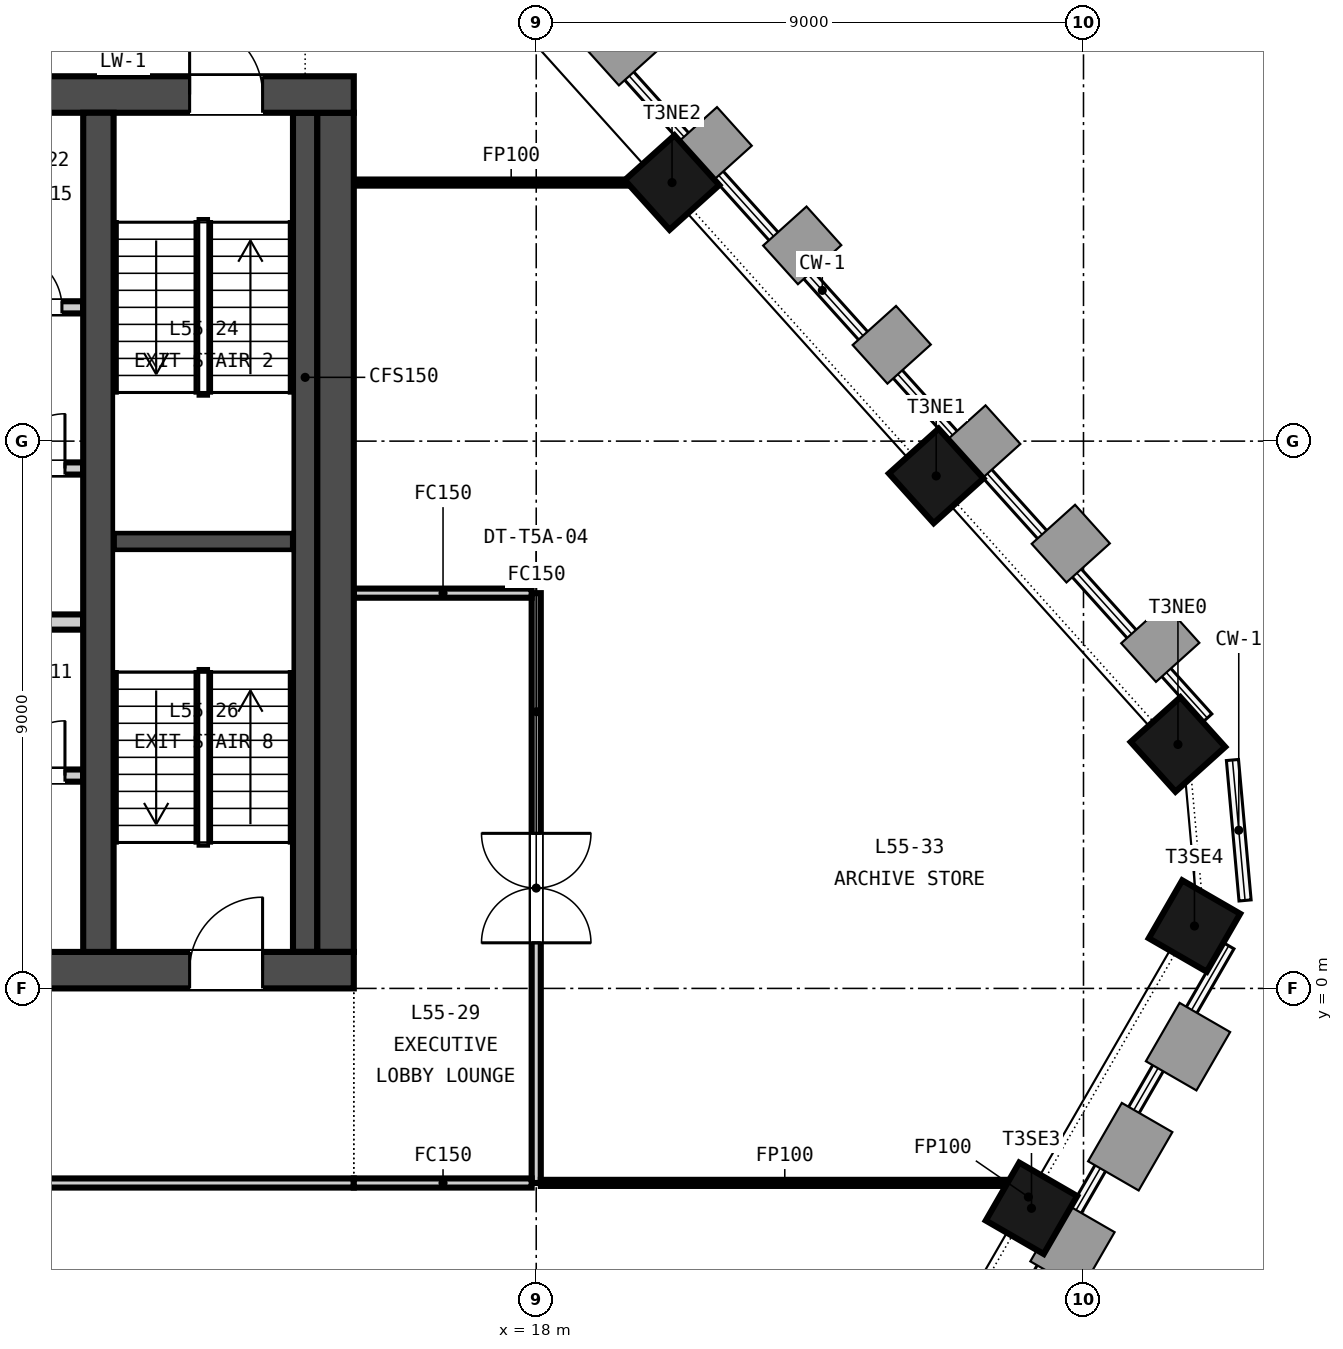
"""IFC4 building model, lengths in metres.
Left out: names, types, materials, properties, quantities, classifications, styles, units other than length and angle.
Written with IfcOpenShell. Run it as: python <this file> out.ifc"""

import sys

from ifc_helpers import new_model, si_unit, direction, frame, frame_2d, origin, origin_2d, place, context, subcontext, project, spatial, rectangle, extrude, element, fill, save


model = new_model("IFC4")
c1 = context("Model", 3, precision=1e-05, world=origin(), true_north=direction((0.0, 1.0)))
c2 = subcontext(c1, "Body", "Model", "MODEL_VIEW")
j1 = project(units=[si_unit("LENGTHUNIT", "METRE"), si_unit("PLANEANGLEUNIT", "RADIAN")], contexts=[c1])
p1 = place(None, origin())
s1 = spatial("IfcSite", under=j1, at=p1, CompositionType="ELEMENT")
p2 = place(p1, origin())
s2 = spatial("IfcBuilding", under=s1, at=p2, CompositionType="ELEMENT")
p3 = place(p2, frame((0.0, 0.0, 219.95)))
s3 = spatial("IfcBuildingStorey", under=s2, at=p3, CompositionType="ELEMENT", Elevation=219.95)
p4 = place(p3, frame((-15.0, 0.3, -0.15), z_axis=(0.0, 0.0, 1.0), x_axis=(1.0, 0.0, 0.0)))
e1 = element("IfcWall", 1, at=p4, inside=s3, PredefinedType="SOLIDWALL", context=c2, shape_type="SweptSolid", body=[
    extrude(rectangle(XDim=30.0, YDim=0.6, at=frame_2d((15.0, 0.0))), origin(), (0.0, 0.0, 1.0), 3.65),
])
p5 = place(p4, frame((5.8, 0.0, 0.15)))
e2 = element("IfcOpeningElement", 2, at=p5, cuts=e1, PredefinedType="OPENING", context=c2, shape_type="SweptSolid", body=[
    extrude(rectangle(XDim=2.4, YDim=2.4, at=frame_2d((1.2, 1.2))), frame((0.0, 0.31, 0.0), z_axis=(0.0, -1.0, 0.0), x_axis=(1.0, 0.0, 0.0)), (0.0, 0.0, 1.0), 0.62),
])
p6 = place(p4, frame((13.8, 0.0, 0.15)))
e3 = element("IfcOpeningElement", 3, at=p6, cuts=e1, PredefinedType="OPENING", context=c2, shape_type="SweptSolid", body=[
    extrude(rectangle(XDim=2.4, YDim=2.4, at=frame_2d((1.2, 1.2))), frame((0.0, 0.31, 0.0), z_axis=(0.0, -1.0, 0.0), x_axis=(1.0, 0.0, 0.0)), (0.0, 0.0, 1.0), 0.62),
])
p7 = place(p4, frame((21.8, 0.0, 0.15)))
e4 = element("IfcOpeningElement", 4, at=p7, cuts=e1, PredefinedType="OPENING", context=c2, shape_type="SweptSolid", body=[
    extrude(rectangle(XDim=2.4, YDim=2.4, at=frame_2d((1.2, 1.2))), frame((0.0, 0.31, 0.0), z_axis=(0.0, -1.0, 0.0), x_axis=(1.0, 0.0, 0.0)), (0.0, 0.0, 1.0), 0.62),
])
p8 = place(p4, frame((1.5, 0.0, 0.15)))
e5 = element("IfcOpeningElement", 5, at=p8, cuts=e1, PredefinedType="OPENING", context=c2, shape_type="SweptSolid", body=[
    extrude(rectangle(XDim=1.2, YDim=2.1, at=frame_2d((0.6, 1.05))), frame((0.0, 0.31, 0.0), z_axis=(0.0, -1.0, 0.0), x_axis=(1.0, 0.0, 0.0)), (0.0, 0.0, 1.0), 0.62),
])
p9 = place(p4, frame((27.3, 0.0, 0.15)))
e6 = element("IfcOpeningElement", 6, at=p9, cuts=e1, PredefinedType="OPENING", context=c2, shape_type="SweptSolid", body=[
    extrude(rectangle(XDim=1.2, YDim=2.1, at=frame_2d((0.6, 1.05))), frame((0.0, 0.31, 0.0), z_axis=(0.0, -1.0, 0.0), x_axis=(1.0, 0.0, 0.0)), (0.0, 0.0, 1.0), 0.62),
])
p10 = place(p3, frame((-15.0, 14.7, -0.15), z_axis=(0.0, 0.0, 1.0), x_axis=(1.0, 0.0, 0.0)))
e7 = element("IfcWall", 7, at=p10, inside=s3, PredefinedType="SOLIDWALL", context=c2, shape_type="SweptSolid", body=[
    extrude(rectangle(XDim=30.0, YDim=0.6, at=frame_2d((15.0, 0.0))), origin(), (0.0, 0.0, 1.0), 3.65),
])
p11 = place(p10, frame((9.25, 0.0, 0.15)))
e8 = element("IfcOpeningElement", 8, at=p11, cuts=e7, PredefinedType="OPENING", context=c2, shape_type="SweptSolid", body=[
    extrude(rectangle(XDim=1.5, YDim=2.1, at=frame_2d((0.75, 1.05))), frame((0.0, 0.31, 0.0), z_axis=(0.0, -1.0, 0.0), x_axis=(1.0, 0.0, 0.0)), (0.0, 0.0, 1.0), 0.62),
])
p12 = place(p10, frame((19.4, 0.0, 0.15)))
e9 = element("IfcOpeningElement", 9, at=p12, cuts=e7, PredefinedType="OPENING", context=c2, shape_type="SweptSolid", body=[
    extrude(rectangle(XDim=1.5, YDim=2.1, at=frame_2d((0.75, 1.05))), frame((0.0, 0.31, 0.0), z_axis=(0.0, -1.0, 0.0), x_axis=(1.0, 0.0, 0.0)), (0.0, 0.0, 1.0), 0.62),
])
p13 = place(p10, frame((1.5, 0.0, 0.15)))
e10 = element("IfcOpeningElement", 10, at=p13, cuts=e7, PredefinedType="OPENING", context=c2, shape_type="SweptSolid", body=[
    extrude(rectangle(XDim=1.2, YDim=2.1, at=frame_2d((0.6, 1.05))), frame((0.0, 0.31, 0.0), z_axis=(0.0, -1.0, 0.0), x_axis=(1.0, 0.0, 0.0)), (0.0, 0.0, 1.0), 0.62),
])
p14 = place(p10, frame((27.3, 0.0, 0.15)))
e11 = element("IfcOpeningElement", 11, at=p14, cuts=e7, PredefinedType="OPENING", context=c2, shape_type="SweptSolid", body=[
    extrude(rectangle(XDim=1.2, YDim=2.1, at=frame_2d((0.6, 1.05))), frame((0.0, 0.31, 0.0), z_axis=(0.0, -1.0, 0.0), x_axis=(1.0, 0.0, 0.0)), (0.0, 0.0, 1.0), 0.62),
])
p15 = place(p3, frame((14.7, 0.6, -0.15), z_axis=(0.0, 0.0, 1.0), x_axis=(0.0, 1.0, 0.0)))
e12 = element("IfcWall", 12, at=p15, inside=s3, PredefinedType="SOLIDWALL", context=c2, shape_type="SweptSolid", body=[
    extrude(rectangle(XDim=13.8, YDim=0.6, at=frame_2d((6.9, 0.0))), origin(), (0.0, 0.0, 1.0), 3.65),
])
p16 = place(p3, frame((10.8, 0.6, -0.15), z_axis=(0.0, 0.0, 1.0), x_axis=(0.0, 1.0, 0.0)))
e13 = element("IfcWall", 13, at=p16, inside=s3, PredefinedType="SOLIDWALL", context=c2, shape_type="SweptSolid", body=[
    extrude(rectangle(XDim=13.8, YDim=0.5, at=frame_2d((6.9, 0.0))), origin(), (0.0, 0.0, 1.0), 3.65),
])
for number, where, z_axis, x_axis in (
    (14, (26.145, -3.616, -0.15), (0.0, 0.0, 1.0), (0.5, 0.866, 0.0)),
    (15, (28.825, 1.026, -0.15), (0.0, 0.0, 1.0), (0.5, 0.866, 0.0)),
    (16, (28.553, 4.012, -0.15), (0.0, 0.0, 1.0), (-0.669, 0.743, 0.0)),
    (17, (24.577, 8.427, -0.15), (0.0, 0.0, 1.0), (-0.669, 0.743, 0.0)),
    (18, (20.233, 13.252, -0.15), (0.0, 0.0, 1.0), (-0.669, 0.743, 0.0)),
):
    element("IfcColumn", number, at=place(p3, frame(where, z_axis=z_axis, x_axis=x_axis)), inside=s3, PredefinedType="COLUMN", context=c2, shape_type="SweptSolid", body=[
        extrude(rectangle(XDim=1.1, YDim=1.1, at=origin_2d()), origin(), (0.0, 0.0, 1.0), 3.65),
    ])
p17 = place(p3, frame((-10.55, 3.5, 0.0), z_axis=(0.0, 0.0, 1.0), x_axis=(1.0, 0.0, 0.0)))
e19 = element("IfcWall", 19, at=p17, inside=s3, PredefinedType="PARTITIONING", context=c2, shape_type="SweptSolid", body=[
    extrude(rectangle(XDim=21.1, YDim=0.2, at=frame_2d((10.55, 0.0))), origin(), (0.0, 0.0, 1.0), 3.5),
])
p18 = place(p17, frame((0.675, 0.0, 0.0)))
e20 = element("IfcOpeningElement", 20, at=p18, cuts=e19, PredefinedType="OPENING", context=c2, shape_type="SweptSolid", body=[
    extrude(rectangle(XDim=1.2, YDim=2.1, at=frame_2d((0.6, 1.05))), frame((0.0, 0.11, 0.0), z_axis=(0.0, -1.0, 0.0), x_axis=(1.0, 0.0, 0.0)), (0.0, 0.0, 1.0), 0.22),
])
p19 = place(p17, frame((3.475, 0.0, 0.0)))
e21 = element("IfcOpeningElement", 21, at=p19, cuts=e19, PredefinedType="OPENING", context=c2, shape_type="SweptSolid", body=[
    extrude(rectangle(XDim=1.2, YDim=2.1, at=frame_2d((0.6, 1.05))), frame((0.0, 0.11, 0.0), z_axis=(0.0, -1.0, 0.0), x_axis=(1.0, 0.0, 0.0)), (0.0, 0.0, 1.0), 0.22),
])
p20 = place(p17, frame((6.275, 0.0, 0.0)))
e22 = element("IfcOpeningElement", 22, at=p20, cuts=e19, PredefinedType="OPENING", context=c2, shape_type="SweptSolid", body=[
    extrude(rectangle(XDim=1.2, YDim=2.1, at=frame_2d((0.6, 1.05))), frame((0.0, 0.11, 0.0), z_axis=(0.0, -1.0, 0.0), x_axis=(1.0, 0.0, 0.0)), (0.0, 0.0, 1.0), 0.22),
])
p21 = place(p17, frame((9.075, 0.0, 0.0)))
e23 = element("IfcOpeningElement", 23, at=p21, cuts=e19, PredefinedType="OPENING", context=c2, shape_type="SweptSolid", body=[
    extrude(rectangle(XDim=1.2, YDim=2.1, at=frame_2d((0.6, 1.05))), frame((0.0, 0.11, 0.0), z_axis=(0.0, -1.0, 0.0), x_axis=(1.0, 0.0, 0.0)), (0.0, 0.0, 1.0), 0.22),
])
p22 = place(p17, frame((11.875, 0.0, 0.0)))
e24 = element("IfcOpeningElement", 24, at=p22, cuts=e19, PredefinedType="OPENING", context=c2, shape_type="SweptSolid", body=[
    extrude(rectangle(XDim=1.2, YDim=2.1, at=frame_2d((0.6, 1.05))), frame((0.0, 0.11, 0.0), z_axis=(0.0, -1.0, 0.0), x_axis=(1.0, 0.0, 0.0)), (0.0, 0.0, 1.0), 0.22),
])
p23 = place(p17, frame((14.675, 0.0, 0.0)))
e25 = element("IfcOpeningElement", 25, at=p23, cuts=e19, PredefinedType="OPENING", context=c2, shape_type="SweptSolid", body=[
    extrude(rectangle(XDim=1.2, YDim=2.1, at=frame_2d((0.6, 1.05))), frame((0.0, 0.11, 0.0), z_axis=(0.0, -1.0, 0.0), x_axis=(1.0, 0.0, 0.0)), (0.0, 0.0, 1.0), 0.22),
])
p24 = place(p17, frame((17.475, 0.0, 0.0)))
e26 = element("IfcOpeningElement", 26, at=p24, cuts=e19, PredefinedType="OPENING", context=c2, shape_type="SweptSolid", body=[
    extrude(rectangle(XDim=1.2, YDim=2.1, at=frame_2d((0.6, 1.05))), frame((0.0, 0.11, 0.0), z_axis=(0.0, -1.0, 0.0), x_axis=(1.0, 0.0, 0.0)), (0.0, 0.0, 1.0), 0.22),
])
p25 = place(p17, frame((19.9, 0.0, 0.0)))
e27 = element("IfcOpeningElement", 27, at=p25, cuts=e19, PredefinedType="OPENING", context=c2, shape_type="SweptSolid", body=[
    extrude(rectangle(XDim=0.9, YDim=2.1, at=frame_2d((0.45, 1.05))), frame((0.0, 0.11, 0.0), z_axis=(0.0, -1.0, 0.0), x_axis=(1.0, 0.0, 0.0)), (0.0, 0.0, 1.0), 0.22),
])
p26 = place(p3, frame((-10.55, 6.025, 0.0), z_axis=(0.0, 0.0, 1.0), x_axis=(1.0, 0.0, 0.0)))
e28 = element("IfcWall", 28, at=p26, inside=s3, PredefinedType="PARTITIONING", context=c2, shape_type="SweptSolid", body=[
    extrude(rectangle(XDim=21.1, YDim=0.25, at=frame_2d((10.55, 0.0))), origin(), (0.0, 0.0, 1.0), 3.5),
])
p27 = place(p3, frame((-4.125, 8.55, 0.0), z_axis=(0.0, 0.0, 1.0), x_axis=(1.0, 0.0, 0.0)))
e29 = element("IfcWall", 29, at=p27, inside=s3, PredefinedType="PARTITIONING", context=c2, shape_type="SweptSolid", body=[
    extrude(rectangle(XDim=14.675, YDim=0.2, at=frame_2d((7.337, 0.0))), origin(), (0.0, 0.0, 1.0), 3.5),
])
p28 = place(p27, frame((2.438, 0.0, 0.0)))
e30 = element("IfcOpeningElement", 30, at=p28, cuts=e29, PredefinedType="OPENING", context=c2, shape_type="SweptSolid", body=[
    extrude(rectangle(XDim=1.0, YDim=2.1, at=frame_2d((0.5, 1.05))), frame((0.0, 0.11, 0.0), z_axis=(0.0, -1.0, 0.0), x_axis=(1.0, 0.0, 0.0)), (0.0, 0.0, 1.0), 0.22),
])
p29 = place(p27, frame((6.775, 0.0, 0.0)))
e31 = element("IfcOpeningElement", 31, at=p29, cuts=e29, PredefinedType="OPENING", context=c2, shape_type="SweptSolid", body=[
    extrude(rectangle(XDim=1.0, YDim=2.1, at=frame_2d((0.5, 1.05))), frame((0.0, 0.11, 0.0), z_axis=(0.0, -1.0, 0.0), x_axis=(1.0, 0.0, 0.0)), (0.0, 0.0, 1.0), 0.22),
])
p30 = place(p27, frame((10.363, 0.0, 0.0)))
e32 = element("IfcOpeningElement", 32, at=p30, cuts=e29, PredefinedType="OPENING", context=c2, shape_type="SweptSolid", body=[
    extrude(rectangle(XDim=1.0, YDim=2.1, at=frame_2d((0.5, 1.05))), frame((0.0, 0.11, 0.0), z_axis=(0.0, -1.0, 0.0), x_axis=(1.0, 0.0, 0.0)), (0.0, 0.0, 1.0), 0.22),
])
p31 = place(p27, frame((13.475, 0.0, 0.0)))
e33 = element("IfcOpeningElement", 33, at=p31, cuts=e29, PredefinedType="OPENING", context=c2, shape_type="SweptSolid", body=[
    extrude(rectangle(XDim=0.9, YDim=2.1, at=frame_2d((0.45, 1.05))), frame((0.0, 0.11, 0.0), z_axis=(0.0, -1.0, 0.0), x_axis=(1.0, 0.0, 0.0)), (0.0, 0.0, 1.0), 0.22),
])
p32 = place(p3, frame((5.9, 11.2, 0.0), z_axis=(0.0, 0.0, 1.0), x_axis=(1.0, 0.0, 0.0)))
e34 = element("IfcWall", 34, at=p32, inside=s3, PredefinedType="PARTITIONING", context=c2, shape_type="SweptSolid", body=[
    extrude(rectangle(XDim=4.65, YDim=0.2, at=frame_2d((2.325, 0.0))), origin(), (0.0, 0.0, 1.0), 3.5),
])
p33 = place(p32, frame((1.075, 0.0, 0.0)))
e35 = element("IfcOpeningElement", 35, at=p33, cuts=e34, PredefinedType="OPENING", context=c2, shape_type="SweptSolid", body=[
    extrude(rectangle(XDim=0.9, YDim=2.1, at=frame_2d((0.45, 1.05))), frame((0.0, 0.11, 0.0), z_axis=(0.0, -1.0, 0.0), x_axis=(1.0, 0.0, 0.0)), (0.0, 0.0, 1.0), 0.22),
])
p34 = place(p32, frame((3.4, 0.0, 0.0)))
e36 = element("IfcOpeningElement", 36, at=p34, cuts=e34, PredefinedType="OPENING", context=c2, shape_type="SweptSolid", body=[
    extrude(rectangle(XDim=0.9, YDim=2.1, at=frame_2d((0.45, 1.05))), frame((0.0, 0.11, 0.0), z_axis=(0.0, -1.0, 0.0), x_axis=(1.0, 0.0, 0.0)), (0.0, 0.0, 1.0), 0.22),
])
p35 = place(p3, frame((11.05, 7.35, 0.0), z_axis=(0.0, 0.0, 1.0), x_axis=(1.0, 0.0, 0.0)))
e37 = element("IfcWall", 37, at=p35, inside=s3, PredefinedType="SOLIDWALL", context=c2, shape_type="SweptSolid", body=[
    extrude(rectangle(XDim=2.95, YDim=0.3, at=frame_2d((1.475, 0.0))), origin(), (0.0, 0.0, 1.0), 3.5),
])
p36 = place(p3, frame((14.2, 0.6, 0.0), z_axis=(0.0, 0.0, 1.0), x_axis=(0.0, 1.0, 0.0)))
e38 = element("IfcWall", 38, at=p36, inside=s3, PredefinedType="SOLIDWALL", context=c2, shape_type="SweptSolid", body=[
    extrude(rectangle(XDim=13.8, YDim=0.4, at=frame_2d((6.9, 0.0))), origin(), (0.0, 0.0, 1.0), 3.5),
])
p37 = place(p3, frame((15.0, -3.2, 0.0), z_axis=(0.0, 0.0, 1.0), x_axis=(-1.0, 0.0, 0.0)))
e39 = element("IfcWall", 39, at=p37, inside=s3, PredefinedType="PARTITIONING", context=c2, shape_type="SweptSolid", body=[
    extrude(rectangle(XDim=30.0, YDim=0.15, at=frame_2d((15.0, 0.0))), origin(), (0.0, 0.0, 1.0), 2.751),
])
p38 = place(p37, frame((14.1, 0.0, 0.0)))
e40 = element("IfcOpeningElement", 40, at=p38, cuts=e39, PredefinedType="OPENING", context=c2, shape_type="SweptSolid", body=[
    extrude(rectangle(XDim=1.8, YDim=2.1, at=frame_2d((0.9, 1.05))), frame((0.0, 0.085, 0.0), z_axis=(0.0, -1.0, 0.0), x_axis=(1.0, 0.0, 0.0)), (0.0, 0.0, 1.0), 0.17),
])
p39 = place(p3, frame((18.0, 6.5, 0.0), z_axis=(0.0, 0.0, 1.0), x_axis=(0.0, -1.0, 0.0)))
e41 = element("IfcWall", 41, at=p39, inside=s3, PredefinedType="PARTITIONING", context=c2, shape_type="SweptSolid", body=[
    extrude(rectangle(XDim=9.7, YDim=0.15, at=frame_2d((4.85, 0.0))), origin(), (0.0, 0.0, 1.0), 2.751),
])
p40 = place(p39, frame((3.95, 0.0, 0.0)))
e42 = element("IfcOpeningElement", 42, at=p40, cuts=e41, PredefinedType="OPENING", context=c2, shape_type="SweptSolid", body=[
    extrude(rectangle(XDim=1.8, YDim=2.1, at=frame_2d((0.9, 1.05))), frame((0.0, 0.085, 0.0), z_axis=(0.0, -1.0, 0.0), x_axis=(1.0, 0.0, 0.0)), (0.0, 0.0, 1.0), 0.17),
])
p41 = place(p3, frame((17.925, -3.2, 0.0), z_axis=(0.0, 0.0, 1.0), x_axis=(-1.0, 0.0, 0.0)))
e43 = element("IfcWall", 43, at=p41, inside=s3, PredefinedType="PARTITIONING", context=c2, shape_type="SweptSolid", body=[
    extrude(rectangle(XDim=2.925, YDim=0.15, at=frame_2d((1.462, 0.0))), origin(), (0.0, 0.0, 1.0), 2.751),
])
p42 = place(p3, frame((15.0, 13.252, 0.0), z_axis=(0.0, 0.0, 1.0), x_axis=(1.0, 0.0, 0.0)))
e44 = element("IfcWall", 44, at=p42, inside=s3, PredefinedType="PARTITIONING", context=c2, shape_type="SweptSolid", body=[
    extrude(rectangle(XDim=5.166, YDim=0.1, at=frame_2d((2.583, 0.0))), origin(), (0.0, 0.0, 1.0), 2.751),
])
p43 = place(p3, frame((15.0, 6.5, 0.0), z_axis=(0.0, 0.0, 1.0), x_axis=(1.0, 0.0, 0.0)))
e45 = element("IfcWall", 45, at=p43, inside=s3, PredefinedType="PARTITIONING", context=c2, shape_type="SweptSolid", body=[
    extrude(rectangle(XDim=2.925, YDim=0.15, at=frame_2d((1.462, 0.0))), origin(), (0.0, 0.0, 1.0), 2.751),
])
p44 = place(p3, frame((18.076, -3.198, 0.0), z_axis=(0.0, 0.0, 1.0), x_axis=(1.0, 0.0, 0.0)))
e46 = element("IfcWall", 46, at=p44, inside=s3, PredefinedType="PARTITIONING", context=c2, shape_type="SweptSolid", body=[
    extrude(rectangle(XDim=8.013, YDim=0.1, at=frame_2d((4.007, 0.0))), origin(), (0.0, 0.0, 1.0), 2.751),
])
p45 = place(p3, frame((26.089, -3.613, 0.0), z_axis=(0.0, 0.0, 1.0), x_axis=(0.0, 1.0, 0.0)))
e47 = element("IfcWall", 47, at=p45, inside=s3, PredefinedType="PARTITIONING", context=c2, shape_type="SweptSolid", body=[
    extrude(rectangle(XDim=0.365, YDim=0.1, at=frame_2d((0.183, 0.0))), origin(), (0.0, 0.0, 1.0), 2.751),
])
p46 = place(p25, origin())
e48 = element("IfcDoor", 48, at=p46, inside=s3, OperationType="SINGLE_SWING_RIGHT", PredefinedType="DOOR", context=c2, shape_type="SweptSolid", body=[
    extrude(rectangle(XDim=0.9, YDim=2.1, at=frame_2d((0.45, 1.05))), frame((0.0, 0.025, 0.0), z_axis=(0.0, -1.0, 0.0), x_axis=(1.0, 0.0, 0.0)), (0.0, 0.0, 1.0), 0.05),
])
fill(e27, e48)
p47 = place(p31, origin())
e49 = element("IfcDoor", 49, at=p47, inside=s3, OperationType="SINGLE_SWING_RIGHT", PredefinedType="DOOR", context=c2, shape_type="SweptSolid", body=[
    extrude(rectangle(XDim=0.9, YDim=2.1, at=frame_2d((0.45, 1.05))), frame((0.0, 0.025, 0.0), z_axis=(0.0, -1.0, 0.0), x_axis=(1.0, 0.0, 0.0)), (0.0, 0.0, 1.0), 0.05),
])
fill(e33, e49)
p48 = place(p34, origin())
e50 = element("IfcDoor", 50, at=p48, inside=s3, OperationType="SINGLE_SWING_LEFT", PredefinedType="DOOR", context=c2, shape_type="SweptSolid", body=[
    extrude(rectangle(XDim=0.9, YDim=2.1, at=frame_2d((0.45, 1.05))), frame((0.0, 0.025, 0.0), z_axis=(0.0, -1.0, 0.0), x_axis=(1.0, 0.0, 0.0)), (0.0, 0.0, 1.0), 0.05),
])
fill(e36, e50)
p49 = place(p14, origin())
e51 = element("IfcDoor", 51, at=p49, inside=s3, OperationType="SINGLE_SWING_LEFT", PredefinedType="DOOR", context=c2, shape_type="SweptSolid", body=[
    extrude(rectangle(XDim=1.2, YDim=2.1, at=frame_2d((0.6, 1.05))), frame((0.0, 0.025, 0.0), z_axis=(0.0, -1.0, 0.0), x_axis=(1.0, 0.0, 0.0)), (0.0, 0.0, 1.0), 0.05),
])
fill(e11, e51)
p50 = place(p9, origin())
e52 = element("IfcDoor", 52, at=p50, inside=s3, OperationType="SINGLE_SWING_RIGHT", PredefinedType="DOOR", context=c2, shape_type="SweptSolid", body=[
    extrude(rectangle(XDim=1.2, YDim=2.1, at=frame_2d((0.6, 1.05))), frame((0.0, 0.025, 0.0), z_axis=(0.0, -1.0, 0.0), x_axis=(1.0, 0.0, 0.0)), (0.0, 0.0, 1.0), 0.05),
])
fill(e6, e52)
p51 = place(p40, origin())
e53 = element("IfcDoor", 53, at=p51, inside=s3, OperationType="DOUBLE_DOOR_DOUBLE_SWING", PredefinedType="DOOR", context=c2, shape_type="SweptSolid", body=[
    extrude(rectangle(XDim=1.8, YDim=2.1, at=frame_2d((0.9, 1.05))), frame((0.0, 0.025, 0.0), z_axis=(0.0, -1.0, 0.0), x_axis=(1.0, 0.0, 0.0)), (0.0, 0.0, 1.0), 0.05),
])
fill(e42, e53)
save(model, sys.argv[1])
